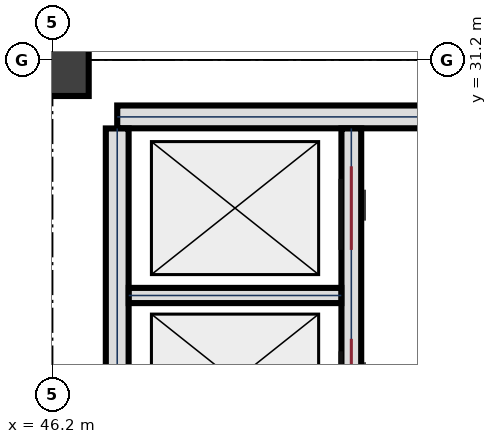
"""IFC4 building model, lengths in metres.
Left out: names, types, materials, properties, quantities, classifications, styles, units other than length and angle.
Written with IfcOpenShell. Run it as: python <this file> out.ifc"""

import sys

from ifc_helpers import new_model, si_unit, direction, frame, frame_2d, origin, origin_2d, place, context, subcontext, project, spatial, rectangle, extrude, element, fill, save


model = new_model("IFC4")
c1 = context("Model", 3, precision=1e-05, world=origin(), true_north=direction((0.0, 1.0)))
c2 = subcontext(c1, "Body", "Model", "MODEL_VIEW")
j1 = project(units=[si_unit("LENGTHUNIT", "METRE"), si_unit("PLANEANGLEUNIT", "RADIAN")], contexts=[c1])
p1 = place(None, origin())
s1 = spatial("IfcSite", under=j1, at=p1, CompositionType="ELEMENT")
p2 = place(p1, origin())
s2 = spatial("IfcBuilding", under=s1, at=p2, CompositionType="ELEMENT")
p3 = place(p2, frame((0.0, 0.0, -8.4)))
s3 = spatial("IfcBuildingStorey", under=s2, at=p3, CompositionType="ELEMENT", Elevation=-8.4)
p4 = place(p3, frame((46.2, 31.2, 0.0), z_axis=(0.0, 0.0, 1.0), x_axis=(1.0, 0.0, 0.0)))
e1 = element("IfcColumn", 1, at=p4, inside=s3, PredefinedType="COLUMN", context=c2, shape_type="SweptSolid", body=[
    extrude(rectangle(XDim=0.95, YDim=0.95, at=origin_2d()), origin(), (0.0, 0.0, 1.0), 4.2),
])
p5 = place(p3, frame((47.05, 30.45, 0.0), z_axis=(0.0, 0.0, 1.0), x_axis=(1.0, 0.0, 0.0)))
e2 = element("IfcWall", 2, at=p5, inside=s3, PredefinedType="SHEAR", context=c2, shape_type="SweptSolid", body=[
    extrude(rectangle(XDim=9.5, YDim=0.3, at=frame_2d((4.75, 0.0))), origin(), (0.0, 0.0, 1.0), 4.2),
])
p6 = place(p3, frame((47.05, 22.502, 0.0), z_axis=(0.0, 0.0, 1.0), x_axis=(0.0, 1.0, 0.0)))
e3 = element("IfcWall", 3, at=p6, inside=s3, PredefinedType="SHEAR", context=c2, shape_type="SweptSolid", body=[
    extrude(rectangle(XDim=7.796, YDim=0.3, at=frame_2d((3.898, 0.0))), origin(), (0.0, 0.0, 1.0), 4.2),
])
p7 = place(p3, frame((50.13, 25.962, 0.0), z_axis=(0.0, 0.0, 1.0), x_axis=(0.0, 1.0, 0.0)))
e4 = element("IfcWall", 4, at=p7, inside=s3, PredefinedType="SHEAR", context=c2, shape_type="SweptSolid", body=[
    extrude(rectangle(XDim=4.336, YDim=0.26, at=frame_2d((2.168, 0.0))), origin(), (0.0, 0.0, 1.0), 4.2),
])
p8 = place(p7, frame((0.468, 0.0, 0.0)))
e5 = element("IfcOpeningElement", 5, at=p8, cuts=e4, PredefinedType="OPENING", context=c2, shape_type="SweptSolid", body=[
    extrude(rectangle(XDim=1.1, YDim=2.15, at=frame_2d((0.55, 1.075))), frame((0.0, 0.14, 0.0), z_axis=(0.0, -1.0, 0.0), x_axis=(1.0, 0.0, 0.0)), (0.0, 0.0, 1.0), 0.28),
])
p9 = place(p7, frame((2.738, 0.0, 0.0)))
e6 = element("IfcOpeningElement", 6, at=p9, cuts=e4, PredefinedType="OPENING", context=c2, shape_type="SweptSolid", body=[
    extrude(rectangle(XDim=1.1, YDim=2.15, at=frame_2d((0.55, 1.075))), frame((0.0, 0.14, 0.0), z_axis=(0.0, -1.0, 0.0), x_axis=(1.0, 0.0, 0.0)), (0.0, 0.0, 1.0), 0.28),
])
p10 = place(p3, frame((47.202, 28.1, 0.0), z_axis=(0.0, 0.0, 1.0), x_axis=(1.0, 0.0, 0.0)))
e7 = element("IfcWall", 7, at=p10, inside=s3, PredefinedType="PLUMBINGWALL", context=c2, shape_type="SweptSolid", body=[
    extrude(rectangle(XDim=2.796, YDim=0.2, at=frame_2d((1.398, 0.0))), origin(), (0.0, 0.0, 1.0), 3.86),
])
p11 = place(p8, origin())
e8 = element("IfcDoor", 8, at=p11, inside=s3, OperationType="SLIDING_TO_LEFT", PredefinedType="DOOR", context=c2, shape_type="SweptSolid", body=[
    extrude(rectangle(XDim=1.1, YDim=2.15, at=frame_2d((0.55, 1.075))), frame((0.0, 0.032, 0.0), z_axis=(0.0, -1.0, 0.0), x_axis=(1.0, 0.0, 0.0)), (0.0, 0.0, 1.0), 0.065),
])
fill(e5, e8)
p12 = place(p9, origin())
e9 = element("IfcDoor", 9, at=p12, inside=s3, OperationType="SLIDING_TO_LEFT", PredefinedType="DOOR", context=c2, shape_type="SweptSolid", body=[
    extrude(rectangle(XDim=1.1, YDim=2.15, at=frame_2d((0.55, 1.075))), frame((0.0, 0.032, 0.0), z_axis=(0.0, -1.0, 0.0), x_axis=(1.0, 0.0, 0.0)), (0.0, 0.0, 1.0), 0.065),
])
fill(e6, e9)
save(model, sys.argv[1])
